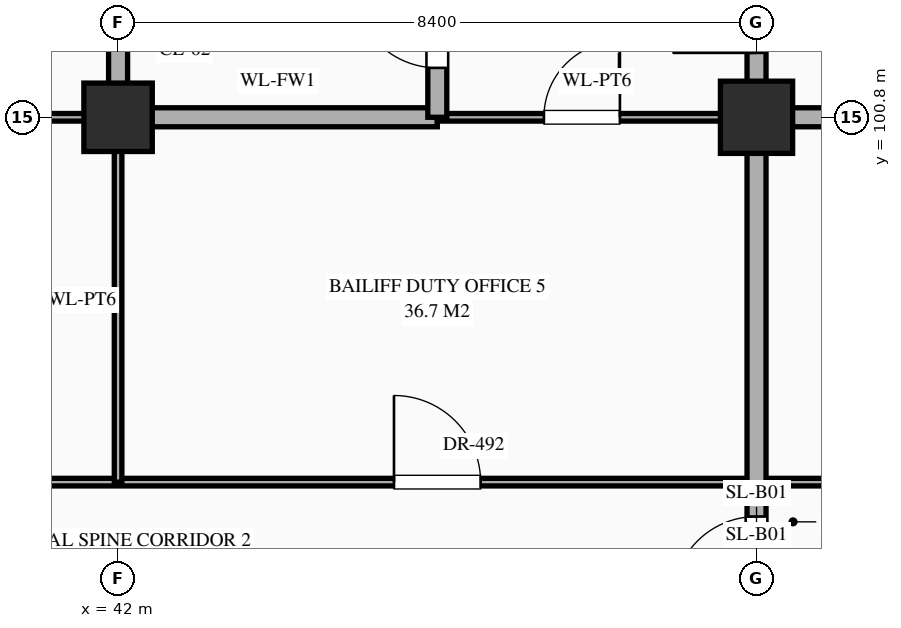
"""IFC4 building model, lengths in metres.
Left out: names, types, materials, properties, quantities, classifications, styles, units other than length and angle.
Written with IfcOpenShell. Run it as: python <this file> out.ifc"""

import sys

from ifc_helpers import new_model, si_unit, direction, frame, frame_2d, origin, origin_2d, place, context, subcontext, project, spatial, rectangle, extrude, element, fill, save


model = new_model("IFC4")
c1 = context("Model", 3, precision=1e-05, world=origin(), true_north=direction((0.0, 1.0)))
c2 = subcontext(c1, "Body", "Model", "MODEL_VIEW")
j1 = project(units=[si_unit("LENGTHUNIT", "METRE"), si_unit("PLANEANGLEUNIT", "RADIAN")], contexts=[c1])
p1 = place(None, origin())
s1 = spatial("IfcSite", under=j1, at=p1, CompositionType="ELEMENT")
p2 = place(p1, origin())
s2 = spatial("IfcBuilding", under=s1, at=p2, CompositionType="ELEMENT")
p3 = place(p2, frame((0.0, 0.0, -5.4)))
s3 = spatial("IfcBuildingStorey", under=s2, at=p3, CompositionType="ELEMENT", Elevation=-5.4)
p4 = place(p3, frame((42.0, 100.8, 0.0), z_axis=(0.0, 0.0, 1.0), x_axis=(1.0, 0.0, 0.0)))
e1 = element("IfcColumn", 1, at=p4, inside=s3, PredefinedType="COLUMN", context=c2, shape_type="SweptSolid", body=[
    extrude(rectangle(XDim=0.9, YDim=0.9, at=origin_2d()), origin(), (0.0, 0.0, 1.0), 5.4),
])
p5 = place(p3, frame((50.4, 100.8, 0.0), z_axis=(0.0, 0.0, 1.0), x_axis=(1.0, 0.0, 0.0)))
e2 = element("IfcColumn", 2, at=p5, inside=s3, PredefinedType="COLUMN", context=c2, shape_type="SweptSolid", body=[
    extrude(rectangle(XDim=0.95, YDim=0.95, at=origin_2d()), origin(), (0.0, 0.0, 1.0), 5.4),
])
p6 = place(p3, frame((16.8, 96.0, 0.0), z_axis=(0.0, 0.0, 1.0), x_axis=(1.0, 0.0, 0.0)))
e3 = element("IfcWall", 3, at=p6, inside=s3, PredefinedType="STANDARD", context=c2, shape_type="SweptSolid", body=[
    extrude(rectangle(XDim=134.4, YDim=0.1, at=frame_2d((67.2, 0.0))), origin(), (0.0, 0.0, 1.0), 5.1),
])
p7 = place(p6, frame((3.56, 0.0, 0.0)))
e4 = element("IfcOpeningElement", 4, at=p7, cuts=e3, PredefinedType="OPENING", context=c2, shape_type="SweptSolid", body=[
    extrude(rectangle(XDim=1.28, YDim=2.35, at=frame_2d((0.64, 1.175))), frame((0.0, 0.062, 0.0), z_axis=(0.0, -1.0, 0.0), x_axis=(1.0, 0.0, 0.0)), (0.0, 0.0, 1.0), 0.124),
])
p8 = place(p6, frame((9.63, 0.0, 0.0)))
e5 = element("IfcOpeningElement", 5, at=p8, cuts=e3, PredefinedType="OPENING", context=c2, shape_type="SweptSolid", body=[
    extrude(rectangle(XDim=0.94, YDim=2.3, at=frame_2d((0.47, 1.15))), frame((0.0, 0.062, 0.0), z_axis=(0.0, -1.0, 0.0), x_axis=(1.0, 0.0, 0.0)), (0.0, 0.0, 1.0), 0.124),
])
p9 = place(p6, frame((12.51, 0.0, 0.0)))
e6 = element("IfcOpeningElement", 6, at=p9, cuts=e3, PredefinedType="OPENING", context=c2, shape_type="SweptSolid", body=[
    extrude(rectangle(XDim=0.98, YDim=2.35, at=frame_2d((0.49, 1.175))), frame((0.0, 0.062, 0.0), z_axis=(0.0, -1.0, 0.0), x_axis=(1.0, 0.0, 0.0)), (0.0, 0.0, 1.0), 0.124),
])
p10 = place(p6, frame((14.99, 0.0, 0.0)))
e7 = element("IfcOpeningElement", 7, at=p10, cuts=e3, PredefinedType="OPENING", context=c2, shape_type="SweptSolid", body=[
    extrude(rectangle(XDim=1.02, YDim=2.4, at=frame_2d((0.51, 1.2))), frame((0.0, 0.062, 0.0), z_axis=(0.0, -1.0, 0.0), x_axis=(1.0, 0.0, 0.0)), (0.0, 0.0, 1.0), 0.124),
])
p11 = place(p6, frame((20.47, 0.0, 0.0)))
e8 = element("IfcOpeningElement", 8, at=p11, cuts=e3, PredefinedType="OPENING", context=c2, shape_type="SweptSolid", body=[
    extrude(rectangle(XDim=1.06, YDim=2.4, at=frame_2d((0.53, 1.2))), frame((0.0, 0.062, 0.0), z_axis=(0.0, -1.0, 0.0), x_axis=(1.0, 0.0, 0.0)), (0.0, 0.0, 1.0), 0.124),
])
p12 = place(p6, frame((28.83, 0.0, 0.0)))
e9 = element("IfcOpeningElement", 9, at=p12, cuts=e3, PredefinedType="OPENING", context=c2, shape_type="SweptSolid", body=[
    extrude(rectangle(XDim=1.14, YDim=2.4, at=frame_2d((0.57, 1.2))), frame((0.0, 0.062, 0.0), z_axis=(0.0, -1.0, 0.0), x_axis=(1.0, 0.0, 0.0)), (0.0, 0.0, 1.0), 0.124),
])
p13 = place(p6, frame((34.78, 0.0, 0.0)))
e10 = element("IfcOpeningElement", 10, at=p13, cuts=e3, PredefinedType="OPENING", context=c2, shape_type="SweptSolid", body=[
    extrude(rectangle(XDim=1.04, YDim=2.2, at=frame_2d((0.52, 1.1))), frame((0.0, 0.062, 0.0), z_axis=(0.0, -1.0, 0.0), x_axis=(1.0, 0.0, 0.0)), (0.0, 0.0, 1.0), 0.124),
])
p14 = place(p6, frame((37.66, 0.0, 0.0)))
e11 = element("IfcOpeningElement", 11, at=p14, cuts=e3, PredefinedType="OPENING", context=c2, shape_type="SweptSolid", body=[
    extrude(rectangle(XDim=1.08, YDim=2.25, at=frame_2d((0.54, 1.125))), frame((0.0, 0.062, 0.0), z_axis=(0.0, -1.0, 0.0), x_axis=(1.0, 0.0, 0.0)), (0.0, 0.0, 1.0), 0.124),
])
p15 = place(p6, frame((40.14, 0.0, 0.0)))
e12 = element("IfcOpeningElement", 12, at=p15, cuts=e3, PredefinedType="OPENING", context=c2, shape_type="SweptSolid", body=[
    extrude(rectangle(XDim=1.12, YDim=2.25, at=frame_2d((0.56, 1.125))), frame((0.0, 0.062, 0.0), z_axis=(0.0, -1.0, 0.0), x_axis=(1.0, 0.0, 0.0)), (0.0, 0.0, 1.0), 0.124),
])
p16 = place(p6, frame((45.62, 0.0, 0.0)))
e13 = element("IfcOpeningElement", 13, at=p16, cuts=e3, PredefinedType="OPENING", context=c2, shape_type="SweptSolid", body=[
    extrude(rectangle(XDim=1.16, YDim=2.3, at=frame_2d((0.58, 1.15))), frame((0.0, 0.062, 0.0), z_axis=(0.0, -1.0, 0.0), x_axis=(1.0, 0.0, 0.0)), (0.0, 0.0, 1.0), 0.124),
])
p17 = place(p6, frame((54.0, 0.0, 0.0)))
e14 = element("IfcOpeningElement", 14, at=p17, cuts=e3, PredefinedType="OPENING", context=c2, shape_type="SweptSolid", body=[
    extrude(rectangle(XDim=1.2, YDim=2.35, at=frame_2d((0.6, 1.175))), frame((0.0, 0.062, 0.0), z_axis=(0.0, -1.0, 0.0), x_axis=(1.0, 0.0, 0.0)), (0.0, 0.0, 1.0), 0.124),
])
p18 = place(p6, frame((62.38, 0.0, 0.0)))
e15 = element("IfcOpeningElement", 15, at=p18, cuts=e3, PredefinedType="OPENING", context=c2, shape_type="SweptSolid", body=[
    extrude(rectangle(XDim=1.24, YDim=2.3, at=frame_2d((0.62, 1.15))), frame((0.0, 0.062, 0.0), z_axis=(0.0, -1.0, 0.0), x_axis=(1.0, 0.0, 0.0)), (0.0, 0.0, 1.0), 0.124),
])
p19 = place(p6, frame((68.37, 0.0, 0.0)))
e16 = element("IfcOpeningElement", 16, at=p19, cuts=e3, PredefinedType="OPENING", context=c2, shape_type="SweptSolid", body=[
    extrude(rectangle(XDim=1.06, YDim=2.4, at=frame_2d((0.53, 1.2))), frame((0.0, 0.062, 0.0), z_axis=(0.0, -1.0, 0.0), x_axis=(1.0, 0.0, 0.0)), (0.0, 0.0, 1.0), 0.124),
])
p20 = place(p6, frame((71.23, 0.0, 0.0)))
e17 = element("IfcOpeningElement", 17, at=p20, cuts=e3, PredefinedType="OPENING", context=c2, shape_type="SweptSolid", body=[
    extrude(rectangle(XDim=1.14, YDim=2.4, at=frame_2d((0.57, 1.2))), frame((0.0, 0.062, 0.0), z_axis=(0.0, -1.0, 0.0), x_axis=(1.0, 0.0, 0.0)), (0.0, 0.0, 1.0), 0.124),
])
p21 = place(p6, frame((73.85, 0.0, 0.0)))
e18 = element("IfcOpeningElement", 18, at=p21, cuts=e3, PredefinedType="OPENING", context=c2, shape_type="SweptSolid", body=[
    extrude(rectangle(XDim=0.9, YDim=2.15, at=frame_2d((0.45, 1.075))), frame((0.0, 0.062, 0.0), z_axis=(0.0, -1.0, 0.0), x_axis=(1.0, 0.0, 0.0)), (0.0, 0.0, 1.0), 0.124),
])
p22 = place(p6, frame((79.37, 0.0, 0.0)))
e19 = element("IfcOpeningElement", 19, at=p22, cuts=e3, PredefinedType="OPENING", context=c2, shape_type="SweptSolid", body=[
    extrude(rectangle(XDim=0.86, YDim=2.1, at=frame_2d((0.43, 1.05))), frame((0.0, 0.062, 0.0), z_axis=(0.0, -1.0, 0.0), x_axis=(1.0, 0.0, 0.0)), (0.0, 0.0, 1.0), 0.124),
])
p23 = place(p6, frame((87.74, 0.0, 0.0)))
e20 = element("IfcOpeningElement", 20, at=p23, cuts=e3, PredefinedType="OPENING", context=c2, shape_type="SweptSolid", body=[
    extrude(rectangle(XDim=0.92, YDim=2.15, at=frame_2d((0.46, 1.075))), frame((0.0, 0.062, 0.0), z_axis=(0.0, -1.0, 0.0), x_axis=(1.0, 0.0, 0.0)), (0.0, 0.0, 1.0), 0.124),
])
p24 = place(p6, frame((93.62, 0.0, 0.0)))
e21 = element("IfcOpeningElement", 21, at=p24, cuts=e3, PredefinedType="OPENING", context=c2, shape_type="SweptSolid", body=[
    extrude(rectangle(XDim=0.96, YDim=2.2, at=frame_2d((0.48, 1.1))), frame((0.0, 0.062, 0.0), z_axis=(0.0, -1.0, 0.0), x_axis=(1.0, 0.0, 0.0)), (0.0, 0.0, 1.0), 0.124),
])
p25 = place(p6, frame((96.5, 0.0, 0.0)))
e22 = element("IfcOpeningElement", 22, at=p25, cuts=e3, PredefinedType="OPENING", context=c2, shape_type="SweptSolid", body=[
    extrude(rectangle(XDim=1.0, YDim=2.25, at=frame_2d((0.5, 1.125))), frame((0.0, 0.062, 0.0), z_axis=(0.0, -1.0, 0.0), x_axis=(1.0, 0.0, 0.0)), (0.0, 0.0, 1.0), 0.124),
])
p26 = place(p6, frame((98.98, 0.0, 0.0)))
e23 = element("IfcOpeningElement", 23, at=p26, cuts=e3, PredefinedType="OPENING", context=c2, shape_type="SweptSolid", body=[
    extrude(rectangle(XDim=1.04, YDim=2.2, at=frame_2d((0.52, 1.1))), frame((0.0, 0.062, 0.0), z_axis=(0.0, -1.0, 0.0), x_axis=(1.0, 0.0, 0.0)), (0.0, 0.0, 1.0), 0.124),
])
p27 = place(p6, frame((104.53, 0.0, 0.0)))
e24 = element("IfcOpeningElement", 24, at=p27, cuts=e3, PredefinedType="OPENING", context=c2, shape_type="SweptSolid", body=[
    extrude(rectangle(XDim=0.94, YDim=2.3, at=frame_2d((0.47, 1.15))), frame((0.0, 0.062, 0.0), z_axis=(0.0, -1.0, 0.0), x_axis=(1.0, 0.0, 0.0)), (0.0, 0.0, 1.0), 0.124),
])
p28 = place(p6, frame((112.91, 0.0, 0.0)))
e25 = element("IfcOpeningElement", 25, at=p28, cuts=e3, PredefinedType="OPENING", context=c2, shape_type="SweptSolid", body=[
    extrude(rectangle(XDim=0.98, YDim=2.35, at=frame_2d((0.49, 1.175))), frame((0.0, 0.062, 0.0), z_axis=(0.0, -1.0, 0.0), x_axis=(1.0, 0.0, 0.0)), (0.0, 0.0, 1.0), 0.124),
])
p29 = place(p6, frame((118.79, 0.0, 0.0)))
e26 = element("IfcOpeningElement", 26, at=p29, cuts=e3, PredefinedType="OPENING", context=c2, shape_type="SweptSolid", body=[
    extrude(rectangle(XDim=1.02, YDim=2.4, at=frame_2d((0.51, 1.2))), frame((0.0, 0.062, 0.0), z_axis=(0.0, -1.0, 0.0), x_axis=(1.0, 0.0, 0.0)), (0.0, 0.0, 1.0), 0.124),
])
p30 = place(p6, frame((121.67, 0.0, 0.0)))
e27 = element("IfcOpeningElement", 27, at=p30, cuts=e3, PredefinedType="OPENING", context=c2, shape_type="SweptSolid", body=[
    extrude(rectangle(XDim=1.06, YDim=2.4, at=frame_2d((0.53, 1.2))), frame((0.0, 0.062, 0.0), z_axis=(0.0, -1.0, 0.0), x_axis=(1.0, 0.0, 0.0)), (0.0, 0.0, 1.0), 0.124),
])
p31 = place(p6, frame((124.13, 0.0, 0.0)))
e28 = element("IfcOpeningElement", 28, at=p31, cuts=e3, PredefinedType="OPENING", context=c2, shape_type="SweptSolid", body=[
    extrude(rectangle(XDim=1.14, YDim=2.4, at=frame_2d((0.57, 1.2))), frame((0.0, 0.062, 0.0), z_axis=(0.0, -1.0, 0.0), x_axis=(1.0, 0.0, 0.0)), (0.0, 0.0, 1.0), 0.124),
])
p32 = place(p6, frame((129.75, 0.0, 0.0)))
e29 = element("IfcOpeningElement", 29, at=p32, cuts=e3, PredefinedType="OPENING", context=c2, shape_type="SweptSolid", body=[
    extrude(rectangle(XDim=0.9, YDim=2.15, at=frame_2d((0.45, 1.075))), frame((0.0, 0.062, 0.0), z_axis=(0.0, -1.0, 0.0), x_axis=(1.0, 0.0, 0.0)), (0.0, 0.0, 1.0), 0.124),
])
p33 = place(p3, frame((16.8, 100.8, 0.0), z_axis=(0.0, 0.0, 1.0), x_axis=(1.0, 0.0, 0.0)))
e30 = element("IfcWall", 30, at=p33, inside=s3, PredefinedType="STANDARD", context=c2, shape_type="SweptSolid", body=[
    extrude(rectangle(XDim=25.2, YDim=0.1, at=frame_2d((12.6, 0.0))), origin(), (0.0, 0.0, 1.0), 4.25),
])
p34 = place(p33, frame((3.587, 0.0, 0.0)))
e31 = element("IfcOpeningElement", 31, at=p34, cuts=e30, PredefinedType="OPENING", context=c2, shape_type="SweptSolid", body=[
    extrude(rectangle(XDim=1.2, YDim=2.35, at=frame_2d((0.6, 1.175))), frame((0.0, 0.062, 0.0), z_axis=(0.0, -1.0, 0.0), x_axis=(1.0, 0.0, 0.0)), (0.0, 0.0, 1.0), 0.124),
])
p35 = place(p33, frame((9.665, 0.0, 0.0)))
e32 = element("IfcOpeningElement", 32, at=p35, cuts=e30, PredefinedType="OPENING", context=c2, shape_type="SweptSolid", body=[
    extrude(rectangle(XDim=1.24, YDim=2.3, at=frame_2d((0.62, 1.15))), frame((0.0, 0.062, 0.0), z_axis=(0.0, -1.0, 0.0), x_axis=(1.0, 0.0, 0.0)), (0.0, 0.0, 1.0), 0.124),
])
p36 = place(p33, frame((12.36, 0.0, 0.0)))
e33 = element("IfcOpeningElement", 33, at=p36, cuts=e30, PredefinedType="OPENING", context=c2, shape_type="SweptSolid", body=[
    extrude(rectangle(XDim=1.28, YDim=2.35, at=frame_2d((0.64, 1.175))), frame((0.0, 0.062, 0.0), z_axis=(0.0, -1.0, 0.0), x_axis=(1.0, 0.0, 0.0)), (0.0, 0.0, 1.0), 0.124),
])
p37 = place(p33, frame((14.845, 0.0, 0.0)))
e34 = element("IfcOpeningElement", 34, at=p37, cuts=e30, PredefinedType="OPENING", context=c2, shape_type="SweptSolid", body=[
    extrude(rectangle(XDim=0.94, YDim=2.3, at=frame_2d((0.47, 1.15))), frame((0.0, 0.062, 0.0), z_axis=(0.0, -1.0, 0.0), x_axis=(1.0, 0.0, 0.0)), (0.0, 0.0, 1.0), 0.124),
])
p38 = place(p33, frame((20.51, 0.0, 0.0)))
e35 = element("IfcOpeningElement", 35, at=p38, cuts=e30, PredefinedType="OPENING", context=c2, shape_type="SweptSolid", body=[
    extrude(rectangle(XDim=0.98, YDim=2.35, at=frame_2d((0.49, 1.175))), frame((0.0, 0.062, 0.0), z_axis=(0.0, -1.0, 0.0), x_axis=(1.0, 0.0, 0.0)), (0.0, 0.0, 1.0), 0.124),
])
p39 = place(p3, frame((42.0, 100.8, 0.0), z_axis=(0.0, 0.0, 1.0), x_axis=(1.0, 0.0, 0.0)))
e36 = element("IfcWall", 36, at=p39, inside=s3, PredefinedType="STANDARD", context=c2, shape_type="SweptSolid", body=[
    extrude(rectangle(XDim=4.2, YDim=0.25, at=frame_2d((2.1, 0.0))), origin(), (0.0, 0.0, 1.0), 4.25),
])
p40 = place(p3, frame((46.2, 100.8, 0.0), z_axis=(0.0, 0.0, 1.0), x_axis=(1.0, 0.0, 0.0)))
e37 = element("IfcWall", 37, at=p40, inside=s3, PredefinedType="STANDARD", context=c2, shape_type="SweptSolid", body=[
    extrude(rectangle(XDim=4.2, YDim=0.1, at=frame_2d((2.1, 0.0))), origin(), (0.0, 0.0, 1.0), 4.25),
])
p41 = place(p40, frame((1.403, 0.0, 0.0)))
e38 = element("IfcOpeningElement", 38, at=p41, cuts=e37, PredefinedType="OPENING", context=c2, shape_type="SweptSolid", body=[
    extrude(rectangle(XDim=1.0, YDim=2.25, at=frame_2d((0.5, 1.125))), frame((0.0, 0.062, 0.0), z_axis=(0.0, -1.0, 0.0), x_axis=(1.0, 0.0, 0.0)), (0.0, 0.0, 1.0), 0.124),
])
p42 = place(p3, frame((50.4, 100.8, 0.0), z_axis=(0.0, 0.0, 1.0), x_axis=(1.0, 0.0, 0.0)))
e39 = element("IfcWall", 39, at=p42, inside=s3, PredefinedType="STANDARD", context=c2, shape_type="SweptSolid", body=[
    extrude(rectangle(XDim=3.4, YDim=0.25, at=frame_2d((1.7, 0.0))), origin(), (0.0, 0.0, 1.0), 4.25),
])
p43 = place(p42, frame((1.347, 0.0, 0.0)))
e40 = element("IfcOpeningElement", 40, at=p43, cuts=e39, PredefinedType="OPENING", context=c2, shape_type="SweptSolid", body=[
    extrude(rectangle(XDim=1.1, YDim=2.2, at=frame_2d((0.55, 1.1))), frame((0.0, 0.137, 0.0), z_axis=(0.0, -1.0, 0.0), x_axis=(1.0, 0.0, 0.0)), (0.0, 0.0, 1.0), 0.274),
])
p44 = place(p3, frame((42.0, 96.0, 0.0), z_axis=(0.0, 0.0, 1.0), x_axis=(0.0, 1.0, 0.0)))
e41 = element("IfcWall", 41, at=p44, inside=s3, PredefinedType="STANDARD", context=c2, shape_type="SweptSolid", body=[
    extrude(rectangle(XDim=4.8, YDim=0.1, at=frame_2d((2.4, 0.0))), origin(), (0.0, 0.0, 1.0), 4.35),
])
p45 = place(p3, frame((42.0, 100.8, 0.0), z_axis=(0.0, 0.0, 1.0), x_axis=(0.0, 1.0, 0.0)))
e42 = element("IfcWall", 42, at=p45, inside=s3, PredefinedType="STANDARD", context=c2, shape_type="SweptSolid", body=[
    extrude(rectangle(XDim=3.6, YDim=0.25, at=frame_2d((1.8, 0.0))), origin(), (0.0, 0.0, 1.0), 4.35),
])
p46 = place(p45, frame((0.885, 0.0, 0.0)))
e43 = element("IfcOpeningElement", 43, at=p46, cuts=e42, PredefinedType="OPENING", context=c2, shape_type="SweptSolid", body=[
    extrude(rectangle(XDim=1.0, YDim=2.2, at=frame_2d((0.5, 1.1))), frame((0.0, 0.137, 0.0), z_axis=(0.0, -1.0, 0.0), x_axis=(1.0, 0.0, 0.0)), (0.0, 0.0, 1.0), 0.274),
])
p47 = place(p3, frame((46.2, 100.8, 0.0), z_axis=(0.0, 0.0, 1.0), x_axis=(0.0, 1.0, 0.0)))
e44 = element("IfcWall", 44, at=p47, inside=s3, PredefinedType="STANDARD", context=c2, shape_type="SweptSolid", body=[
    extrude(rectangle(XDim=3.6, YDim=0.25, at=frame_2d((1.8, 0.0))), origin(), (0.0, 0.0, 1.0), 4.65),
])
p48 = place(p47, frame((0.65, 0.0, 0.0)))
e45 = element("IfcOpeningElement", 45, at=p48, cuts=e44, PredefinedType="OPENING", context=c2, shape_type="SweptSolid", body=[
    extrude(rectangle(XDim=1.1, YDim=2.2, at=frame_2d((0.55, 1.1))), frame((0.0, 0.137, 0.0), z_axis=(0.0, -1.0, 0.0), x_axis=(1.0, 0.0, 0.0)), (0.0, 0.0, 1.0), 0.274),
])
p49 = place(p3, frame((50.4, 91.2, 0.0), z_axis=(0.0, 0.0, 1.0), x_axis=(0.0, 1.0, 0.0)))
e46 = element("IfcWall", 46, at=p49, inside=s3, PredefinedType="STANDARD", context=c2, shape_type="SweptSolid", body=[
    extrude(rectangle(XDim=13.2, YDim=0.25, at=frame_2d((6.6, 0.0))), origin(), (0.0, 0.0, 1.0), 4.35),
])
p50 = place(p49, frame((0.528, 0.0, 0.0)))
e47 = element("IfcOpeningElement", 47, at=p50, cuts=e46, PredefinedType="OPENING", context=c2, shape_type="SweptSolid", body=[
    extrude(rectangle(XDim=0.95, YDim=2.15, at=frame_2d((0.475, 1.075))), frame((0.0, 0.137, 0.0), z_axis=(0.0, -1.0, 0.0), x_axis=(1.0, 0.0, 0.0)), (0.0, 0.0, 1.0), 0.274),
])
p51 = place(p49, frame((10.448, 0.0, 0.0)))
e48 = element("IfcOpeningElement", 48, at=p51, cuts=e46, PredefinedType="OPENING", context=c2, shape_type="SweptSolid", body=[
    extrude(rectangle(XDim=1.1, YDim=2.2, at=frame_2d((0.55, 1.1))), frame((0.0, 0.137, 0.0), z_axis=(0.0, -1.0, 0.0), x_axis=(1.0, 0.0, 0.0)), (0.0, 0.0, 1.0), 0.274),
])
p52 = place(p49, frame((3.248, 0.0, 0.0)))
e49 = element("IfcOpeningElement", 49, at=p52, cuts=e46, PredefinedType="OPENING", context=c2, shape_type="SweptSolid", body=[
    extrude(rectangle(XDim=1.1, YDim=2.2, at=frame_2d((0.55, 1.1))), frame((0.0, 0.137, 0.0), z_axis=(0.0, -1.0, 0.0), x_axis=(1.0, 0.0, 0.0)), (0.0, 0.0, 1.0), 0.274),
])
p53 = place(p48, origin())
e50 = element("IfcDoor", 50, at=p53, inside=s3, OperationType="SINGLE_SWING_RIGHT", PredefinedType="DOOR", context=c2, shape_type="SweptSolid", body=[
    extrude(rectangle(XDim=1.1, YDim=2.2, at=frame_2d((0.55, 1.1))), frame((0.0, 0.025, 0.0), z_axis=(0.0, -1.0, 0.0), x_axis=(1.0, 0.0, 0.0)), (0.0, 0.0, 1.0), 0.05),
])
fill(e45, e50)
p54 = place(p51, origin())
e51 = element("IfcDoor", 51, at=p54, inside=s3, OperationType="SINGLE_SWING_LEFT", PredefinedType="DOOR", context=c2, shape_type="SweptSolid", body=[
    extrude(rectangle(XDim=1.1, YDim=2.2, at=frame_2d((0.55, 1.1))), frame((0.0, 0.025, 0.0), z_axis=(0.0, -1.0, 0.0), x_axis=(1.0, 0.0, 0.0)), (0.0, 0.0, 1.0), 0.05),
])
fill(e48, e51)
p55 = place(p41, origin())
e52 = element("IfcDoor", 52, at=p55, inside=s3, OperationType="SINGLE_SWING_RIGHT", PredefinedType="DOOR", context=c2, shape_type="SweptSolid", body=[
    extrude(rectangle(XDim=1.0, YDim=2.25, at=frame_2d((0.5, 1.125))), frame((0.0, 0.025, 0.0), z_axis=(0.0, -1.0, 0.0), x_axis=(1.0, 0.0, 0.0)), (0.0, 0.0, 1.0), 0.05),
])
fill(e38, e52)
p56 = place(p52, origin())
e53 = element("IfcDoor", 53, at=p56, inside=s3, OperationType="SINGLE_SWING_LEFT", PredefinedType="DOOR", context=c2, shape_type="SweptSolid", body=[
    extrude(rectangle(XDim=1.1, YDim=2.2, at=frame_2d((0.55, 1.1))), frame((0.0, 0.025, 0.0), z_axis=(0.0, -1.0, 0.0), x_axis=(1.0, 0.0, 0.0)), (0.0, 0.0, 1.0), 0.05),
])
fill(e49, e53)
p57 = place(p12, origin())
e54 = element("IfcDoor", 54, at=p57, inside=s3, OperationType="SINGLE_SWING_LEFT", PredefinedType="DOOR", context=c2, shape_type="SweptSolid", body=[
    extrude(rectangle(XDim=1.14, YDim=2.4, at=frame_2d((0.57, 1.2))), frame((0.0, 0.025, 0.0), z_axis=(0.0, -1.0, 0.0), x_axis=(1.0, 0.0, 0.0)), (0.0, 0.0, 1.0), 0.05),
])
fill(e9, e54)
save(model, sys.argv[1])
